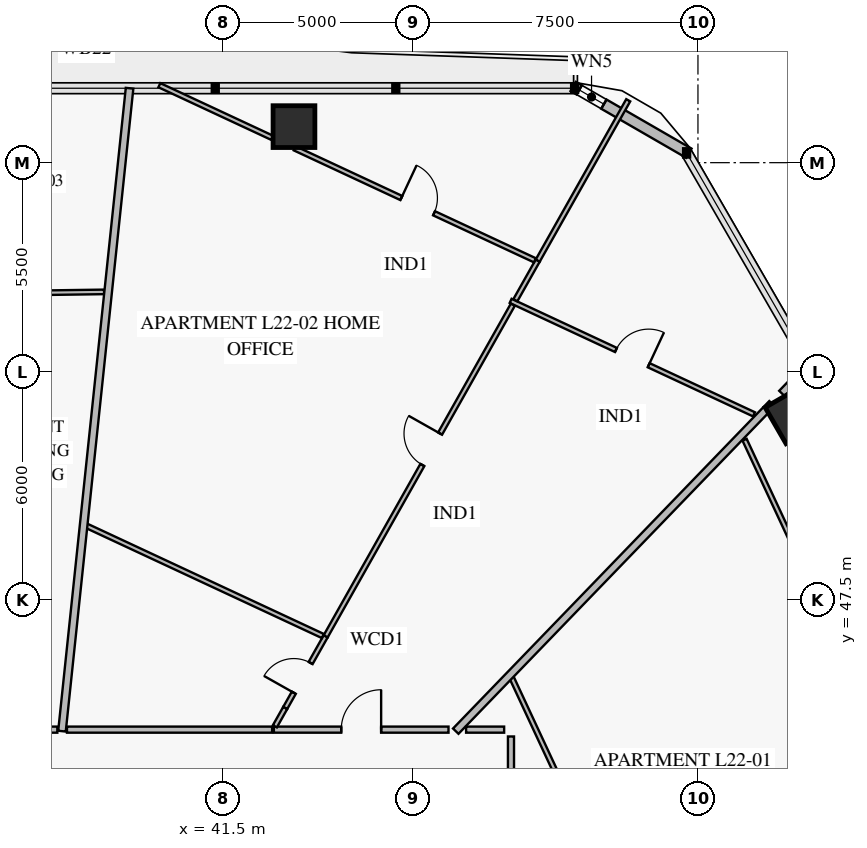
"""IFC4 building model, lengths in metres.
Left out: names, types, materials, properties, quantities, classifications, styles, units other than length and angle.
Written with IfcOpenShell. Run it as: python <this file> out.ifc"""

import sys

from ifc_helpers import new_model, si_unit, direction, frame, frame_2d, origin, origin_2d, place, context, subcontext, project, spatial, rectangle, extrude, element, fill, save


model = new_model("IFC4")
c1 = context("Model", 3, precision=1e-05, world=origin(), true_north=direction((0.0, 1.0)))
c2 = subcontext(c1, "Body", "Model", "MODEL_VIEW")
j1 = project(units=[si_unit("LENGTHUNIT", "METRE"), si_unit("PLANEANGLEUNIT", "RADIAN")], contexts=[c1])
p1 = place(None, origin())
s1 = spatial("IfcSite", under=j1, at=p1, CompositionType="ELEMENT")
p2 = place(p1, origin())
s2 = spatial("IfcBuilding", under=s1, at=p2, CompositionType="ELEMENT")
p3 = place(p2, frame((0.0, 0.0, 92.4)))
s3 = spatial("IfcBuildingStorey", under=s2, at=p3, CompositionType="ELEMENT", Elevation=92.4)
for number, where, z_axis, x_axis in (
    (1, (56.519, 52.357, 0.0), (0.0, 0.0, 1.0), (-0.5, 0.866, 0.0)),
    (2, (43.37, 59.948, 0.0), (0.0, 0.0, 1.0), (-1.0, 0.0, 0.0)),
):
    element("IfcColumn", number, at=place(p3, frame(where, z_axis=z_axis, x_axis=x_axis)), inside=s3, PredefinedType="COLUMN", context=c2, shape_type="SweptSolid", body=[
        extrude(rectangle(XDim=1.1, YDim=1.1, at=origin_2d()), origin(), (0.0, 0.0, 1.0), 3.55),
    ])
p4 = place(p3, frame((50.717, 61.006, 0.0), z_axis=(0.0, 0.0, 1.0), x_axis=(0.866007452331, -0.500031091541, 0.0)))
e3 = element("IfcWall", 3, at=p4, inside=s3, PredefinedType="SOLIDWALL", context=c2, shape_type="SweptSolid", body=[
    extrude(rectangle(XDim=3.515, YDim=0.28, at=frame_2d((1.757, 0.0))), origin(), (0.0, 0.0, 1.0), 3.55),
])
p5 = place(p4, frame((0.182, 0.0, 0.85)))
e4 = element("IfcOpeningElement", 4, at=p5, cuts=e3, PredefinedType="OPENING", context=c2, shape_type="SweptSolid", body=[
    extrude(rectangle(XDim=0.75, YDim=1.5, at=frame_2d((0.375, 0.75))), frame((0.0, 0.152, 0.0), z_axis=(0.0, -1.0, 0.0), x_axis=(1.0, 0.0, 0.0)), (0.0, 0.0, 1.0), 0.304),
])
p6 = place(p3, frame((60.25, 40.937, 0.0), z_axis=(0.0, 0.0, 1.0), x_axis=(-0.42261779654, 0.906308003963, 0.0)))
e5 = element("IfcWall", 5, at=p6, inside=s3, PredefinedType="PARTITIONING", context=c2, shape_type="SweptSolid", body=[
    extrude(rectangle(XDim=11.885, YDim=0.12, at=frame_2d((5.942, 0.0))), origin(), (0.0, 0.0, 1.0), 2.85),
])
p7 = place(p6, frame((5.383, 0.0, 0.0)))
e6 = element("IfcOpeningElement", 6, at=p7, cuts=e5, PredefinedType="OPENING", context=c2, shape_type="SweptSolid", body=[
    extrude(rectangle(XDim=0.95, YDim=2.1, at=frame_2d((0.475, 1.05))), frame((0.0, 0.072, 0.0), z_axis=(0.0, -1.0, 0.0), x_axis=(1.0, 0.0, 0.0)), (0.0, 0.0, 1.0), 0.144),
])
p8 = place(p3, frame((55.475, 52.377, 0.0), z_axis=(0.0, 0.0, 1.0), x_axis=(-0.906311093924, 0.422611170026, 0.0)))
e7 = element("IfcWall", 7, at=p8, inside=s3, PredefinedType="PARTITIONING", context=c2, shape_type="SweptSolid", body=[
    extrude(rectangle(XDim=7.066, YDim=0.12, at=frame_2d((3.533, 0.0))), origin(), (0.0, 0.0, 1.0), 3.55),
])
p9 = place(p8, frame((3.058, 0.0, 0.0)))
e8 = element("IfcOpeningElement", 8, at=p9, cuts=e7, PredefinedType="OPENING", context=c2, shape_type="SweptSolid", body=[
    extrude(rectangle(XDim=0.95, YDim=2.1, at=frame_2d((0.475, 1.05))), frame((0.0, 0.072, 0.0), z_axis=(0.0, -1.0, 0.0), x_axis=(1.0, 0.0, 0.0)), (0.0, 0.0, 1.0), 0.144),
])
p10 = place(p3, frame((43.139, 44.65, 0.0), z_axis=(0.0, 0.0, 1.0), x_axis=(0.491544748093, 0.870852318492, 0.0)))
e9 = element("IfcWall", 9, at=p10, inside=s3, PredefinedType="PARTITIONING", context=c2, shape_type="SweptSolid", body=[
    extrude(rectangle(XDim=2.167, YDim=0.12, at=frame_2d((1.083, 0.0))), origin(), (0.0, 0.0, 1.0), 3.55),
])
p11 = place(p10, frame((0.46, 0.0, 0.0)))
e10 = element("IfcOpeningElement", 10, at=p11, cuts=e9, PredefinedType="OPENING", context=c2, shape_type="SweptSolid", body=[
    extrude(rectangle(XDim=0.9, YDim=2.1, at=frame_2d((0.45, 1.05))), frame((0.0, 0.072, 0.0), z_axis=(0.0, -1.0, 0.0), x_axis=(1.0, 0.0, 0.0)), (0.0, 0.0, 1.0), 0.144),
])
p12 = place(p3, frame((44.204, 46.537, 0.0), z_axis=(0.0, 0.0, 1.0), x_axis=(0.491507930141, 0.870873099027, 0.0)))
e11 = element("IfcWall", 11, at=p12, inside=s3, PredefinedType="PARTITIONING", context=c2, shape_type="SweptSolid", body=[
    extrude(rectangle(XDim=10.019, YDim=0.12, at=frame_2d((5.009, 0.0))), origin(), (0.0, 0.0, 1.0), 3.1),
])
p13 = place(p12, frame((5.176, 0.0, 0.0)))
e12 = element("IfcOpeningElement", 12, at=p13, cuts=e11, PredefinedType="OPENING", context=c2, shape_type="SweptSolid", body=[
    extrude(rectangle(XDim=0.95, YDim=2.1, at=frame_2d((0.475, 1.05))), frame((0.0, 0.072, 0.0), z_axis=(0.0, -1.0, 0.0), x_axis=(1.0, 0.0, 0.0)), (0.0, 0.0, 1.0), 0.144),
])
p14 = place(p3, frame((49.196, 55.38, 0.0), z_axis=(0.0, 0.0, 1.0), x_axis=(0.491432242221, 0.870915811836, 0.0)))
e13 = element("IfcWall", 13, at=p14, inside=s3, PredefinedType="PARTITIONING", context=c2, shape_type="SweptSolid", body=[
    extrude(rectangle(XDim=1.197, YDim=0.12, at=frame_2d((0.599, 0.0))), origin(), (0.0, 0.0, 1.0), 2.8),
])
p15 = place(p3, frame((49.71, 56.43, 0.0), z_axis=(0.0, 0.0, 1.0), x_axis=(-0.906320781417, 0.422590394084, 0.0)))
e14 = element("IfcWall", 14, at=p15, inside=s3, PredefinedType="PARTITIONING", context=c2, shape_type="SweptSolid", body=[
    extrude(rectangle(XDim=6.976, YDim=0.12, at=frame_2d((3.488, 0.0))), origin(), (0.0, 0.0, 1.0), 2.8),
])
p16 = place(p15, frame((2.929, 0.0, 0.0)))
e15 = element("IfcOpeningElement", 15, at=p16, cuts=e14, PredefinedType="OPENING", context=c2, shape_type="SweptSolid", body=[
    extrude(rectangle(XDim=0.95, YDim=2.1, at=frame_2d((0.475, 1.05))), frame((0.0, 0.072, 0.0), z_axis=(0.0, -1.0, 0.0), x_axis=(1.0, 0.0, 0.0)), (0.0, 0.0, 1.0), 0.144),
])
p17 = place(p3, frame((47.436, 44.08, 0.0), z_axis=(0.0, 0.0, 1.0), x_axis=(-1.0, 0.0, 0.0)))
e16 = element("IfcWall", 16, at=p17, inside=s3, PredefinedType="PARTITIONING", context=c2, shape_type="SweptSolid", body=[
    extrude(rectangle(XDim=4.595, YDim=0.16, at=frame_2d((2.297, 0.0))), origin(), (0.0, 0.0, 1.0), 3.55),
])
p18 = place(p17, frame((1.772, 0.0, 0.0)))
e17 = element("IfcOpeningElement", 17, at=p18, cuts=e16, PredefinedType="OPENING", context=c2, shape_type="SweptSolid", body=[
    extrude(rectangle(XDim=1.05, YDim=2.15, at=frame_2d((0.525, 1.075))), frame((0.0, 0.092, 0.0), z_axis=(0.0, -1.0, 0.0), x_axis=(1.0, 0.0, 0.0)), (0.0, 0.0, 1.0), 0.184),
])
p19 = place(p3, frame((38.373, 55.6, 0.0), z_axis=(0.0, 0.0, 1.0), x_axis=(-0.999902567538, -0.01395906268, 0.0)))
e18 = element("IfcWall", 18, at=p19, inside=s3, PredefinedType="PARTITIONING", context=c2, shape_type="SweptSolid", body=[
    extrude(rectangle(XDim=5.404, YDim=0.12, at=frame_2d((2.702, 0.0))), origin(), (0.0, 0.0, 1.0), 3.55),
])
p20 = place(p19, frame((2.227, 0.0, 0.0)))
e19 = element("IfcOpeningElement", 19, at=p20, cuts=e18, PredefinedType="OPENING", context=c2, shape_type="SweptSolid", body=[
    extrude(rectangle(XDim=0.95, YDim=2.1, at=frame_2d((0.475, 1.05))), frame((0.0, 0.072, 0.0), z_axis=(0.0, -1.0, 0.0), x_axis=(1.0, 0.0, 0.0)), (0.0, 0.0, 1.0), 0.144),
])
p21 = place(p3, frame((37.143, 44.08, 0.0), z_axis=(0.0, 0.0, 1.0), x_axis=(-1.0, 0.0, 0.0)))
e20 = element("IfcWall", 20, at=p21, inside=s3, PredefinedType="PARTITIONING", context=c2, shape_type="SweptSolid", body=[
    extrude(rectangle(XDim=2.628, YDim=0.16, at=frame_2d((1.314, 0.0))), origin(), (0.0, 0.0, 1.0), 3.55),
])
p22 = place(p21, frame((0.789, 0.0, 0.0)))
e21 = element("IfcOpeningElement", 21, at=p22, cuts=e20, PredefinedType="OPENING", context=c2, shape_type="SweptSolid", body=[
    extrude(rectangle(XDim=1.05, YDim=2.15, at=frame_2d((0.525, 1.075))), frame((0.0, 0.092, 0.0), z_axis=(0.0, -1.0, 0.0), x_axis=(1.0, 0.0, 0.0)), (0.0, 0.0, 1.0), 0.184),
])
p23 = place(p3, frame((52.519, 38.111, 0.0), z_axis=(0.0, 0.0, 1.0), x_axis=(-0.422610316209, 0.906311492057, 0.0)))
e22 = element("IfcWall", 22, at=p23, inside=s3, PredefinedType="PARTITIONING", context=c2, shape_type="SweptSolid", body=[
    extrude(rectangle(XDim=8.113, YDim=0.12, at=frame_2d((4.056, 0.0))), origin(), (0.0, 0.0, 1.0), 2.85),
])
p24 = place(p3, frame((47.627, 44.04, 0.0), z_axis=(0.0, 0.0, 1.0), x_axis=(0.694659610847, 0.719338602508, 0.0)))
e23 = element("IfcWall", 23, at=p24, inside=s3, PredefinedType="PARTITIONING", context=c2, shape_type="SweptSolid", body=[
    extrude(rectangle(XDim=11.98, YDim=0.2, at=frame_2d((5.99, 0.0))), origin(), (0.0, 0.0, 1.0), 2.8),
])
p25 = place(p3, frame((56.209, 52.927, 0.0), z_axis=(0.0, 0.0, 1.0), x_axis=(0.694716755503, 0.719283413977, 0.0)))
e24 = element("IfcWall", 24, at=p25, inside=s3, PredefinedType="PARTITIONING", context=c2, shape_type="SweptSolid", body=[
    extrude(rectangle(XDim=1.033, YDim=0.2, at=frame_2d((0.517, 0.0))), origin(), (0.0, 0.0, 1.0), 3.55),
])
p26 = place(p3, frame((42.867, 44.168, 0.0), z_axis=(0.0, 0.0, 1.0), x_axis=(0.491475647569, 0.870891318045, 0.0)))
e25 = element("IfcWall", 25, at=p26, inside=s3, PredefinedType="PARTITIONING", context=c2, shape_type="SweptSolid", body=[
    extrude(rectangle(XDim=0.553, YDim=0.12, at=frame_2d((0.277, 0.0))), origin(), (0.0, 0.0, 1.0), 3.55),
])
p27 = place(p3, frame((49.784, 56.423, 0.0), z_axis=(0.0, 0.0, 1.0), x_axis=(0.491502522911, 0.870876150766, 0.0)))
e26 = element("IfcWall", 26, at=p27, inside=s3, PredefinedType="PARTITIONING", context=c2, shape_type="SweptSolid", body=[
    extrude(rectangle(XDim=4.844, YDim=0.12, at=frame_2d((2.422, 0.0))), origin(), (0.0, 0.0, 1.0), 3.55),
])
p28 = place(p3, frame((44.13, 46.543, 0.0), z_axis=(0.0, 0.0, 1.0), x_axis=(-0.90630173442, 0.422631241376, 0.0)))
e27 = element("IfcWall", 27, at=p28, inside=s3, PredefinedType="PARTITIONING", context=c2, shape_type="SweptSolid", body=[
    extrude(rectangle(XDim=6.887, YDim=0.12, at=frame_2d((3.444, 0.0))), origin(), (0.0, 0.0, 1.0), 2.85),
])
p29 = place(p3, frame((42.8, 59.653, 0.0), z_axis=(0.0, 0.0, 1.0), x_axis=(-0.906316219076, 0.422600178702, 0.0)))
e28 = element("IfcWall", 28, at=p29, inside=s3, PredefinedType="PARTITIONING", context=c2, shape_type="SweptSolid", body=[
    extrude(rectangle(XDim=3.28, YDim=0.12, at=frame_2d((1.64, 0.0))), origin(), (0.0, 0.0, 1.0), 2.8),
])
p30 = place(p3, frame((37.265, 44.04, 0.0), z_axis=(0.0, 0.0, 1.0), x_axis=(0.104535371824, 0.994521169226, 0.0)))
e29 = element("IfcWall", 29, at=p30, inside=s3, PredefinedType="PARTITIONING", context=c2, shape_type="SweptSolid", body=[
    extrude(rectangle(XDim=17.012, YDim=0.2, at=frame_2d((8.506, 0.0))), origin(), (0.0, 0.0, 1.0), 2.8),
])
p31 = place(p3, frame((49.08, 36.854, 0.0), z_axis=(0.0, 0.0, 1.0), x_axis=(0.0, 1.0, 0.0)))
e30 = element("IfcWall", 30, at=p31, inside=s3, PredefinedType="PARTITIONING", context=c2, shape_type="SweptSolid", body=[
    extrude(rectangle(XDim=7.046, YDim=0.16, at=frame_2d((3.523, 0.0))), origin(), (0.0, 0.0, 1.0), 3.55),
])
p32 = place(p3, frame((48.9, 44.08, 0.0), z_axis=(0.0, 0.0, 1.0), x_axis=(-1.0, 0.0, 0.0)))
e31 = element("IfcWall", 31, at=p32, inside=s3, PredefinedType="PARTITIONING", context=c2, shape_type="SweptSolid", body=[
    extrude(rectangle(XDim=1.001, YDim=0.16, at=frame_2d((0.5, 0.0))), origin(), (0.0, 0.0, 1.0), 2.85),
])
p33 = place(p3, frame((42.795, 44.08, 0.0), z_axis=(0.0, 0.0, 1.0), x_axis=(-1.0, 0.0, 0.0)))
e32 = element("IfcWall", 32, at=p33, inside=s3, PredefinedType="PARTITIONING", context=c2, shape_type="SweptSolid", body=[
    extrude(rectangle(XDim=5.398, YDim=0.16, at=frame_2d((2.699, 0.0))), origin(), (0.0, 0.0, 1.0), 2.85),
])
p34 = place(p5, origin())
e33 = element("IfcWindow", 33, at=p34, inside=s3, PartitioningType="SINGLE_PANEL", PredefinedType="WINDOW", context=c2, shape_type="SweptSolid", body=[
    extrude(rectangle(XDim=0.75, YDim=1.5, at=frame_2d((0.375, 0.75))), frame((0.0, 0.03, 0.0), z_axis=(0.0, -1.0, 0.0), x_axis=(1.0, 0.0, 0.0)), (0.0, 0.0, 1.0), 0.06),
])
fill(e4, e33)
p35 = place(p9, frame((0.95, 0.0, 0.0), z_axis=(0.0, 0.0, 1.0), x_axis=(-1.0, 0.0, 0.0)))
e34 = element("IfcDoor", 34, at=p35, inside=s3, OperationType="SINGLE_SWING_RIGHT", PredefinedType="DOOR", context=c2, shape_type="SweptSolid", body=[
    extrude(rectangle(XDim=0.95, YDim=2.1, at=frame_2d((0.475, 1.05))), frame((0.0, 0.025, 0.0), z_axis=(0.0, -1.0, 0.0), x_axis=(1.0, 0.0, 0.0)), (0.0, 0.0, 1.0), 0.05),
])
fill(e8, e34)
p36 = place(p11, origin())
e35 = element("IfcDoor", 35, at=p36, inside=s3, OperationType="SINGLE_SWING_LEFT", PredefinedType="DOOR", context=c2, shape_type="SweptSolid", body=[
    extrude(rectangle(XDim=0.9, YDim=2.1, at=frame_2d((0.45, 1.05))), frame((0.0, 0.025, 0.0), z_axis=(0.0, -1.0, 0.0), x_axis=(1.0, 0.0, 0.0)), (0.0, 0.0, 1.0), 0.05),
])
fill(e10, e35)
p37 = place(p13, origin())
e36 = element("IfcDoor", 36, at=p37, inside=s3, OperationType="SINGLE_SWING_RIGHT", PredefinedType="DOOR", context=c2, shape_type="SweptSolid", body=[
    extrude(rectangle(XDim=0.95, YDim=2.1, at=frame_2d((0.475, 1.05))), frame((0.0, 0.025, 0.0), z_axis=(0.0, -1.0, 0.0), x_axis=(1.0, 0.0, 0.0)), (0.0, 0.0, 1.0), 0.05),
])
fill(e12, e36)
p38 = place(p16, frame((0.95, 0.0, 0.0), z_axis=(0.0, 0.0, 1.0), x_axis=(-1.0, 0.0, 0.0)))
e37 = element("IfcDoor", 37, at=p38, inside=s3, OperationType="SINGLE_SWING_LEFT", PredefinedType="DOOR", context=c2, shape_type="SweptSolid", body=[
    extrude(rectangle(XDim=0.95, YDim=2.1, at=frame_2d((0.475, 1.05))), frame((0.0, 0.025, 0.0), z_axis=(0.0, -1.0, 0.0), x_axis=(1.0, 0.0, 0.0)), (0.0, 0.0, 1.0), 0.05),
])
fill(e15, e37)
p39 = place(p18, frame((1.05, 0.0, 0.0), z_axis=(0.0, 0.0, 1.0), x_axis=(-1.0, 0.0, 0.0)))
e38 = element("IfcDoor", 38, at=p39, inside=s3, OperationType="SINGLE_SWING_RIGHT", PredefinedType="DOOR", context=c2, shape_type="SweptSolid", body=[
    extrude(rectangle(XDim=1.05, YDim=2.15, at=frame_2d((0.525, 1.075))), frame((0.0, 0.025, 0.0), z_axis=(0.0, -1.0, 0.0), x_axis=(1.0, 0.0, 0.0)), (0.0, 0.0, 1.0), 0.05),
])
fill(e17, e38)
save(model, sys.argv[1])
